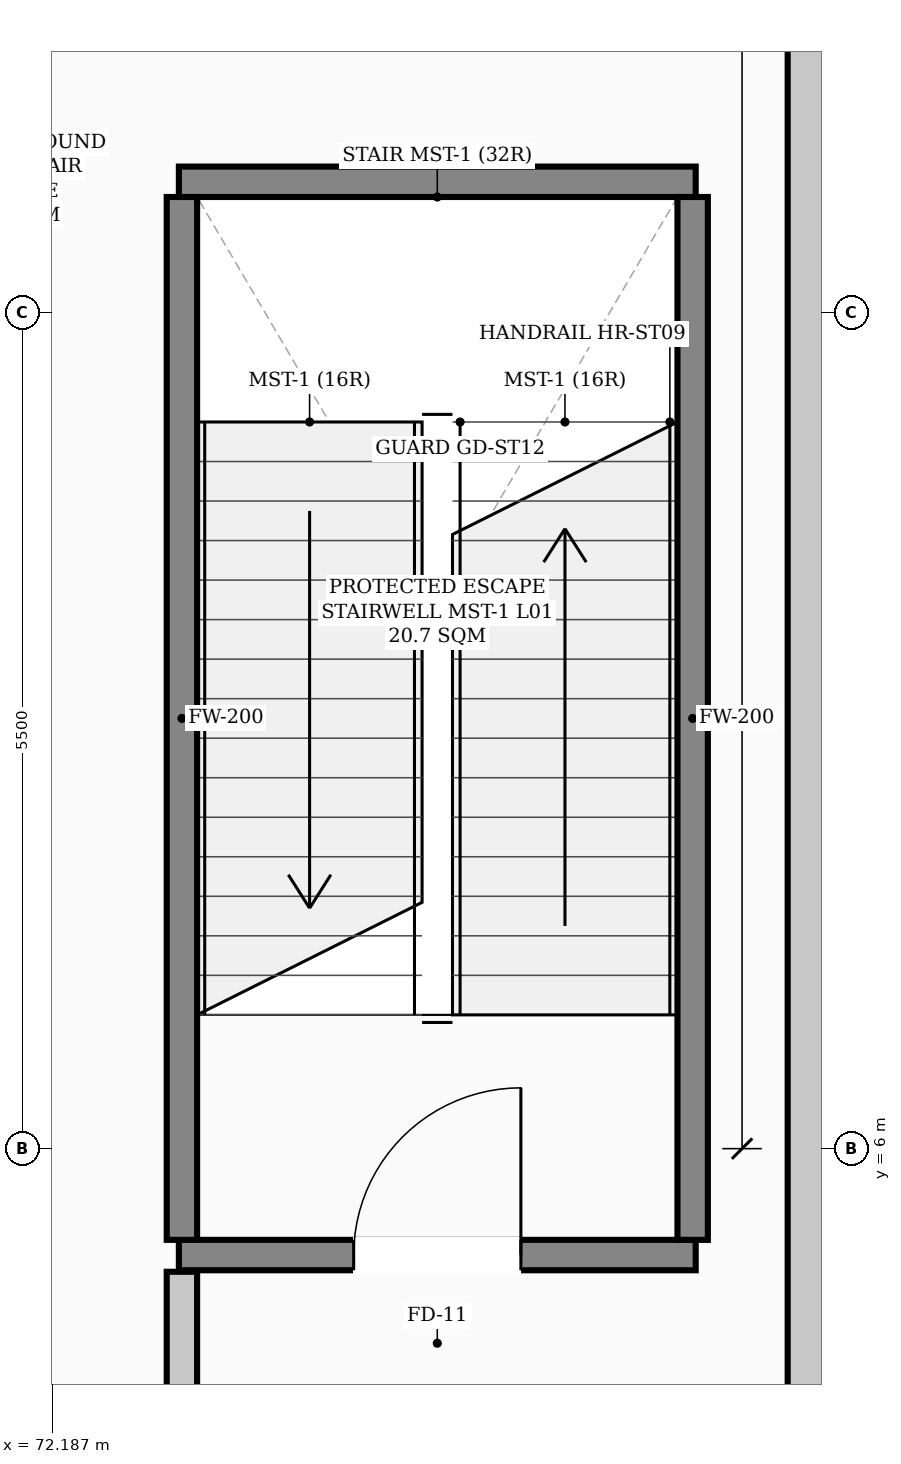
"""IFC4 building model, lengths in metres.
Left out: names, types, materials, properties, quantities, classifications, styles, units other than length and angle.
Written with IfcOpenShell. Run it as: python <this file> out.ifc"""

import sys

from ifc_helpers import new_model, si_unit, direction, frame, frame_2d, origin, place, context, subcontext, project, spatial, rectangle, extrude, element, fill, save


model = new_model("IFC4")
c1 = context("Model", 3, precision=1e-05, world=origin(), true_north=direction((0.0, 1.0)))
c2 = subcontext(c1, "Body", "Model", "MODEL_VIEW")
j1 = project(units=[si_unit("LENGTHUNIT", "METRE"), si_unit("PLANEANGLEUNIT", "RADIAN")], contexts=[c1])
p1 = place(None, origin())
s1 = spatial("IfcSite", under=j1, at=p1, CompositionType="ELEMENT")
p2 = place(p1, origin())
s2 = spatial("IfcBuilding", under=s1, at=p2, CompositionType="ELEMENT")
p3 = place(p2, origin())
s3 = spatial("IfcBuildingStorey", under=s2, at=p3, CompositionType="ELEMENT", Elevation=0.0)
p4 = place(p3, frame((77.15, 0.45, 0.0), z_axis=(0.0, 0.0, 1.0), x_axis=(0.0, 1.0, 0.0)))
e1 = element("IfcWall", 1, at=p4, inside=s3, PredefinedType="STANDARD", context=c2, shape_type="SweptSolid", body=[
    extrude(rectangle(XDim=50.7, YDim=0.25, at=frame_2d((25.35, 0.0))), origin(), (0.0, 0.0, 1.0), 4.75),
])
p5 = place(p3, frame((73.02, 5.3, 0.0), z_axis=(0.0, 0.0, 1.0), x_axis=(1.0, 0.0, 0.0)))
e2 = element("IfcWall", 2, at=p5, inside=s3, PredefinedType="STANDARD", context=c2, shape_type="SweptSolid", body=[
    extrude(rectangle(XDim=3.4, YDim=0.2, at=frame_2d((1.7, 0.0))), origin(), (0.0, 0.0, 1.0), 5.58),
])
p6 = place(p5, frame((1.15, 0.0, 0.0)))
e3 = element("IfcOpeningElement", 3, at=p6, cuts=e2, PredefinedType="OPENING", context=c2, shape_type="SweptSolid", body=[
    extrude(rectangle(XDim=1.1, YDim=2.08, at=frame_2d((0.55, 1.04))), frame((0.0, 0.11, 0.0), z_axis=(0.0, -1.0, 0.0), x_axis=(1.0, 0.0, 0.0)), (0.0, 0.0, 1.0), 0.22),
])
p7 = place(p3, frame((73.02, 12.36, 0.0), z_axis=(0.0, 0.0, 1.0), x_axis=(1.0, 0.0, 0.0)))
e4 = element("IfcWall", 4, at=p7, inside=s3, PredefinedType="STANDARD", context=c2, shape_type="SweptSolid", body=[
    extrude(rectangle(XDim=3.4, YDim=0.2, at=frame_2d((1.7, 0.0))), origin(), (0.0, 0.0, 1.0), 5.58),
])
for number, where, z_axis, x_axis in (
    (5, (73.04, 5.4, 0.0), (0.0, 0.0, 1.0), (0.0, 1.0, 0.0)),
    (6, (76.4, 5.4, 0.0), (0.0, 0.0, 1.0), (0.0, 1.0, 0.0)),
):
    element("IfcWall", number, at=place(p3, frame(where, z_axis=z_axis, x_axis=x_axis)), inside=s3, PredefinedType="STANDARD", context=c2, shape_type="SweptSolid", body=[
        extrude(rectangle(XDim=6.86, YDim=0.2, at=frame_2d((3.43, 0.0))), origin(), (0.0, 0.0, 1.0), 5.58),
    ])
p8 = place(p3, frame((73.04, 0.57, 0.0), z_axis=(0.0, 0.0, 1.0), x_axis=(0.0, 1.0, 0.0)))
e7 = element("IfcWall", 7, at=p8, inside=s3, PredefinedType="STANDARD", context=c2, shape_type="SweptSolid", body=[
    extrude(rectangle(XDim=4.62, YDim=0.2, at=frame_2d((2.31, 0.0))), origin(), (0.0, 0.0, 1.0), 4.96),
])
p9 = place(p8, frame((1.78, 0.0, 0.0)))
e8 = element("IfcOpeningElement", 8, at=p9, cuts=e7, PredefinedType="OPENING", context=c2, shape_type="SweptSolid", body=[
    extrude(rectangle(XDim=1.1, YDim=2.08, at=frame_2d((0.55, 1.04))), frame((0.0, 0.11, 0.0), z_axis=(0.0, -1.0, 0.0), x_axis=(1.0, 0.0, 0.0)), (0.0, 0.0, 1.0), 0.22),
])
p10 = place(p6, origin())
e9 = element("IfcDoor", 9, at=p10, inside=s3, OperationType="SINGLE_SWING_RIGHT", PredefinedType="DOOR", context=c2, shape_type="SweptSolid", body=[
    extrude(rectangle(XDim=1.1, YDim=2.08, at=frame_2d((0.55, 1.04))), frame((0.0, 0.025, 0.0), z_axis=(0.0, -1.0, 0.0), x_axis=(1.0, 0.0, 0.0)), (0.0, 0.0, 1.0), 0.05),
])
fill(e3, e9)
save(model, sys.argv[1])
